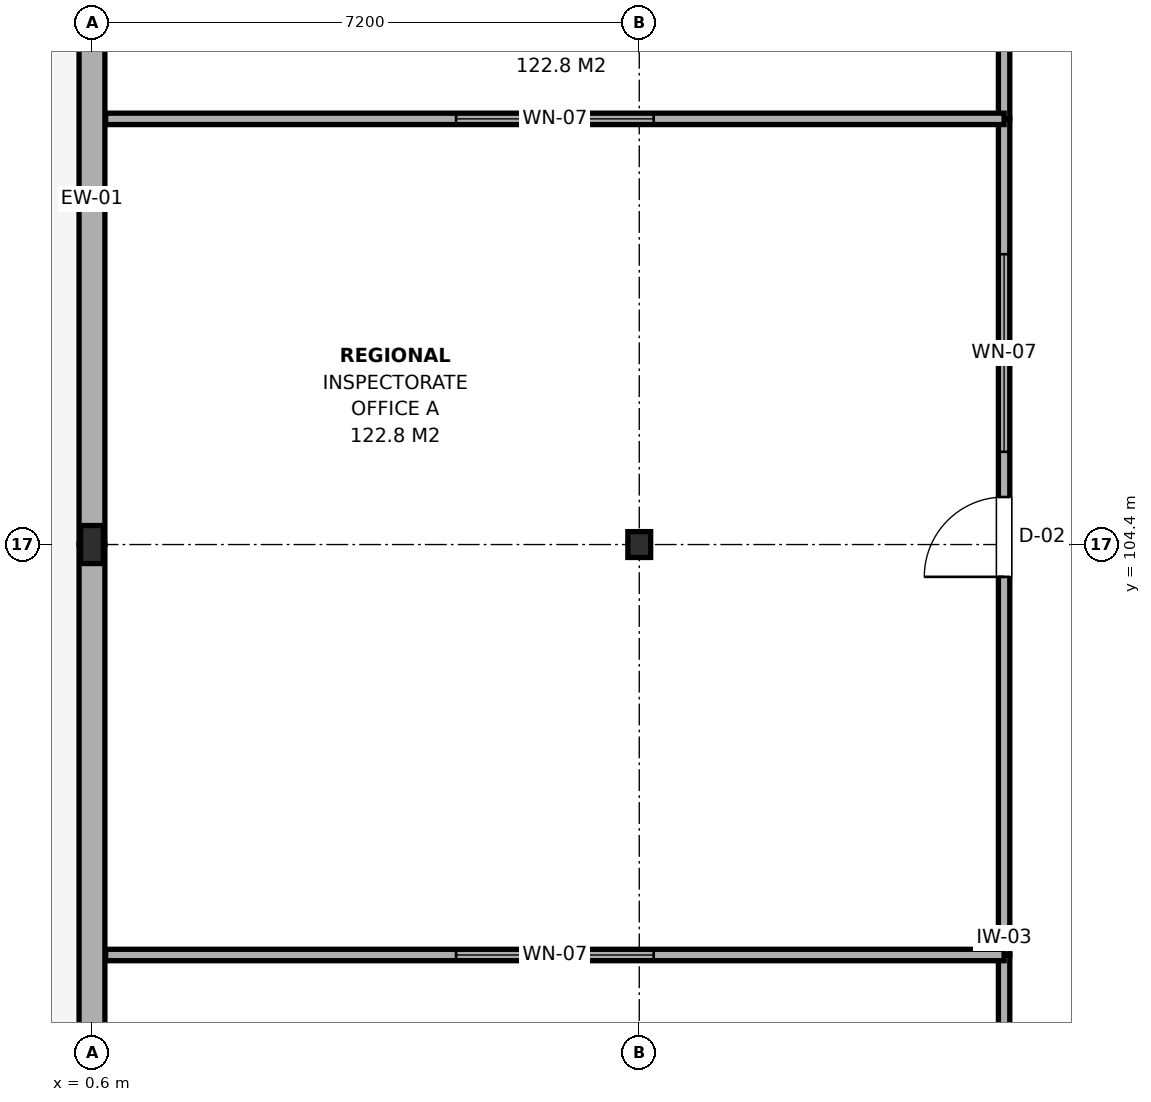
"""IFC4 building model, lengths in metres.
Left out: names, types, materials, properties, quantities, classifications, styles, units other than length and angle.
Written with IfcOpenShell. Run it as: python <this file> out.ifc"""

import sys

from ifc_helpers import new_model, si_unit, direction, frame, frame_2d, origin, origin_2d, place, context, subcontext, project, spatial, rectangle, i_section, extrude, element, fill, save


model = new_model("IFC4")
c1 = context("Model", 3, precision=1e-05, world=origin(), true_north=direction((0.0, 1.0)))
c2 = subcontext(c1, "Body", "Model", "MODEL_VIEW")
j1 = project(units=[si_unit("LENGTHUNIT", "METRE"), si_unit("PLANEANGLEUNIT", "RADIAN")], contexts=[c1])
p1 = place(None, origin())
s1 = spatial("IfcSite", under=j1, at=p1, CompositionType="ELEMENT")
p2 = place(p1, origin())
s2 = spatial("IfcBuilding", under=s1, at=p2, CompositionType="ELEMENT")
p3 = place(p2, frame((0.0, 0.0, 21.0)))
s3 = spatial("IfcBuildingStorey", under=s2, at=p3, CompositionType="ELEMENT", Elevation=21.0)
p4 = place(p3, frame((0.6, 104.4, 0.0), z_axis=(0.0, 0.0, 1.0), x_axis=(1.0, 0.0, 0.0)))
e1 = element("IfcColumn", 1, at=p4, inside=s3, PredefinedType="COLUMN", context=c2, shape_type="SweptSolid", body=[
    extrude(i_section(OverallWidth=0.3, OverallDepth=0.5, WebThickness=0.014, FlangeThickness=0.028, FilletRadius=0.027, at=origin_2d()), origin(), (0.0, 0.0, 1.0), 3.9),
])
p5 = place(p3, frame((7.8, 104.4, 0.0), z_axis=(0.0, 0.0, 1.0), x_axis=(1.0, 0.0, 0.0)))
e2 = element("IfcColumn", 2, at=p5, inside=s3, PredefinedType="COLUMN", context=c2, shape_type="SweptSolid", body=[
    extrude(i_section(OverallWidth=0.3, OverallDepth=0.34, WebThickness=0.012, FlangeThickness=0.021, FilletRadius=0.027, at=origin_2d()), origin(), (0.0, 0.0, 1.0), 3.9),
])
p6 = place(p3, frame((0.6, 96.0, 0.0), z_axis=(0.0, 0.0, 1.0), x_axis=(0.0, 1.0, 0.0)))
e3 = element("IfcWall", 3, at=p6, inside=s3, PredefinedType="SOLIDWALL", context=c2, shape_type="SweptSolid", body=[
    extrude(rectangle(XDim=8.4, YDim=0.34, at=frame_2d((4.2, 0.0))), origin(), (0.0, 0.0, 1.0), 3.105),
])
p7 = place(p3, frame((0.6, 104.4, 0.0), z_axis=(0.0, 0.0, 1.0), x_axis=(0.0, 1.0, 0.0)))
e4 = element("IfcWall", 4, at=p7, inside=s3, PredefinedType="SOLIDWALL", context=c2, shape_type="SweptSolid", body=[
    extrude(rectangle(XDim=9.0, YDim=0.34, at=frame_2d((4.5, 0.0))), origin(), (0.0, 0.0, 1.0), 3.105),
])
p8 = place(p3, frame((12.6, 88.4, 0.0), z_axis=(0.0, 0.0, 1.0), x_axis=(0.0, 1.0, 0.0)))
e5 = element("IfcWall", 5, at=p8, inside=s3, PredefinedType="PARTITIONING", context=c2, shape_type="SweptSolid", body=[
    extrude(rectangle(XDim=10.6, YDim=0.15, at=frame_2d((5.3, 0.0))), origin(), (0.0, 0.0, 1.0), 3.095),
])
p9 = place(p8, frame((4.55, 0.0, 0.0)))
e6 = element("IfcOpeningElement", 6, at=p9, cuts=e5, PredefinedType="OPENING", context=c2, shape_type="SweptSolid", body=[
    extrude(rectangle(XDim=1.5, YDim=2.15, at=frame_2d((0.75, 1.075))), frame((0.0, 0.09, 0.0), z_axis=(0.0, -1.0, 0.0), x_axis=(1.0, 0.0, 0.0)), (0.0, 0.0, 1.0), 0.18),
])
p10 = place(p3, frame((12.6, 99.0, 0.0), z_axis=(0.0, 0.0, 1.0), x_axis=(0.0, 1.0, 0.0)))
e7 = element("IfcWall", 7, at=p10, inside=s3, PredefinedType="PARTITIONING", context=c2, shape_type="SweptSolid", body=[
    extrude(rectangle(XDim=11.0, YDim=0.15, at=frame_2d((5.5, 0.0))), origin(), (0.0, 0.0, 1.0), 3.095),
])
p11 = place(p10, frame((4.975, 0.0, 0.0)))
e8 = element("IfcOpeningElement", 8, at=p11, cuts=e7, PredefinedType="OPENING", context=c2, shape_type="SweptSolid", body=[
    extrude(rectangle(XDim=1.05, YDim=2.15, at=frame_2d((0.525, 1.075))), frame((0.0, 0.09, 0.0), z_axis=(0.0, -1.0, 0.0), x_axis=(1.0, 0.0, 0.0)), (0.0, 0.0, 1.0), 0.18),
])
p12 = place(p10, frame((6.62, 0.0, 0.95)))
e9 = element("IfcOpeningElement", 9, at=p12, cuts=e7, PredefinedType="OPENING", context=c2, shape_type="SweptSolid", body=[
    extrude(rectangle(XDim=2.6, YDim=1.5, at=frame_2d((1.3, 0.75))), frame((0.0, 0.09, 0.0), z_axis=(0.0, -1.0, 0.0), x_axis=(1.0, 0.0, 0.0)), (0.0, 0.0, 1.0), 0.18),
])
p13 = place(p3, frame((0.78, 99.0, 0.0), z_axis=(0.0, 0.0, 1.0), x_axis=(1.0, 0.0, 0.0)))
e10 = element("IfcWall", 10, at=p13, inside=s3, PredefinedType="PARTITIONING", context=c2, shape_type="SweptSolid", body=[
    extrude(rectangle(XDim=11.82, YDim=0.15, at=frame_2d((5.91, 0.0))), origin(), (0.0, 0.0, 1.0), 3.255),
])
p14 = place(p13, frame((4.61, 0.0, 0.95)))
e11 = element("IfcOpeningElement", 11, at=p14, cuts=e10, PredefinedType="OPENING", context=c2, shape_type="SweptSolid", body=[
    extrude(rectangle(XDim=2.6, YDim=1.5, at=frame_2d((1.3, 0.75))), frame((0.0, 0.09, 0.0), z_axis=(0.0, -1.0, 0.0), x_axis=(1.0, 0.0, 0.0)), (0.0, 0.0, 1.0), 0.18),
])
p15 = place(p3, frame((12.6, 110.0, 0.0), z_axis=(0.0, 0.0, 1.0), x_axis=(0.0, 1.0, 0.0)))
e12 = element("IfcWall", 12, at=p15, inside=s3, PredefinedType="PARTITIONING", context=c2, shape_type="SweptSolid", body=[
    extrude(rectangle(XDim=11.0, YDim=0.15, at=frame_2d((5.5, 0.0))), origin(), (0.0, 0.0, 1.0), 3.245),
])
p16 = place(p15, frame((4.975, 0.0, 0.0)))
e13 = element("IfcOpeningElement", 13, at=p16, cuts=e12, PredefinedType="OPENING", context=c2, shape_type="SweptSolid", body=[
    extrude(rectangle(XDim=1.05, YDim=2.15, at=frame_2d((0.525, 1.075))), frame((0.0, 0.09, 0.0), z_axis=(0.0, -1.0, 0.0), x_axis=(1.0, 0.0, 0.0)), (0.0, 0.0, 1.0), 0.18),
])
p17 = place(p15, frame((6.62, 0.0, 0.95)))
e14 = element("IfcOpeningElement", 14, at=p17, cuts=e12, PredefinedType="OPENING", context=c2, shape_type="SweptSolid", body=[
    extrude(rectangle(XDim=2.6, YDim=1.5, at=frame_2d((1.3, 0.75))), frame((0.0, 0.09, 0.0), z_axis=(0.0, -1.0, 0.0), x_axis=(1.0, 0.0, 0.0)), (0.0, 0.0, 1.0), 0.18),
])
p18 = place(p3, frame((0.78, 110.0, 0.0), z_axis=(0.0, 0.0, 1.0), x_axis=(1.0, 0.0, 0.0)))
e15 = element("IfcWall", 15, at=p18, inside=s3, PredefinedType="PARTITIONING", context=c2, shape_type="SweptSolid", body=[
    extrude(rectangle(XDim=11.82, YDim=0.15, at=frame_2d((5.91, 0.0))), origin(), (0.0, 0.0, 1.0), 3.105),
])
p19 = place(p18, frame((4.61, 0.0, 0.95)))
e16 = element("IfcOpeningElement", 16, at=p19, cuts=e15, PredefinedType="OPENING", context=c2, shape_type="SweptSolid", body=[
    extrude(rectangle(XDim=2.6, YDim=1.5, at=frame_2d((1.3, 0.75))), frame((0.0, 0.09, 0.0), z_axis=(0.0, -1.0, 0.0), x_axis=(1.0, 0.0, 0.0)), (0.0, 0.0, 1.0), 0.18),
])
p20 = place(p11, origin())
e17 = element("IfcDoor", 17, at=p20, inside=s3, OperationType="SINGLE_SWING_LEFT", PredefinedType="DOOR", context=c2, shape_type="SweptSolid", body=[
    extrude(rectangle(XDim=1.05, YDim=2.15, at=frame_2d((0.525, 1.075))), frame((0.0, 0.025, 0.0), z_axis=(0.0, -1.0, 0.0), x_axis=(1.0, 0.0, 0.0)), (0.0, 0.0, 1.0), 0.05),
])
fill(e8, e17)
p21 = place(p12, origin())
e18 = element("IfcWindow", 18, at=p21, inside=s3, PartitioningType="SINGLE_PANEL", PredefinedType="WINDOW", context=c2, shape_type="SweptSolid", body=[
    extrude(rectangle(XDim=2.6, YDim=1.5, at=frame_2d((1.3, 0.75))), frame((0.0, 0.03, 0.0), z_axis=(0.0, -1.0, 0.0), x_axis=(1.0, 0.0, 0.0)), (0.0, 0.0, 1.0), 0.06),
])
fill(e9, e18)
p22 = place(p14, origin())
e19 = element("IfcWindow", 19, at=p22, inside=s3, PartitioningType="SINGLE_PANEL", PredefinedType="WINDOW", context=c2, shape_type="SweptSolid", body=[
    extrude(rectangle(XDim=2.6, YDim=1.5, at=frame_2d((1.3, 0.75))), frame((0.0, 0.03, 0.0), z_axis=(0.0, -1.0, 0.0), x_axis=(1.0, 0.0, 0.0)), (0.0, 0.0, 1.0), 0.06),
])
fill(e11, e19)
p23 = place(p19, origin())
e20 = element("IfcWindow", 20, at=p23, inside=s3, PartitioningType="SINGLE_PANEL", PredefinedType="WINDOW", context=c2, shape_type="SweptSolid", body=[
    extrude(rectangle(XDim=2.6, YDim=1.5, at=frame_2d((1.3, 0.75))), frame((0.0, 0.03, 0.0), z_axis=(0.0, -1.0, 0.0), x_axis=(1.0, 0.0, 0.0)), (0.0, 0.0, 1.0), 0.06),
])
fill(e16, e20)
save(model, sys.argv[1])
